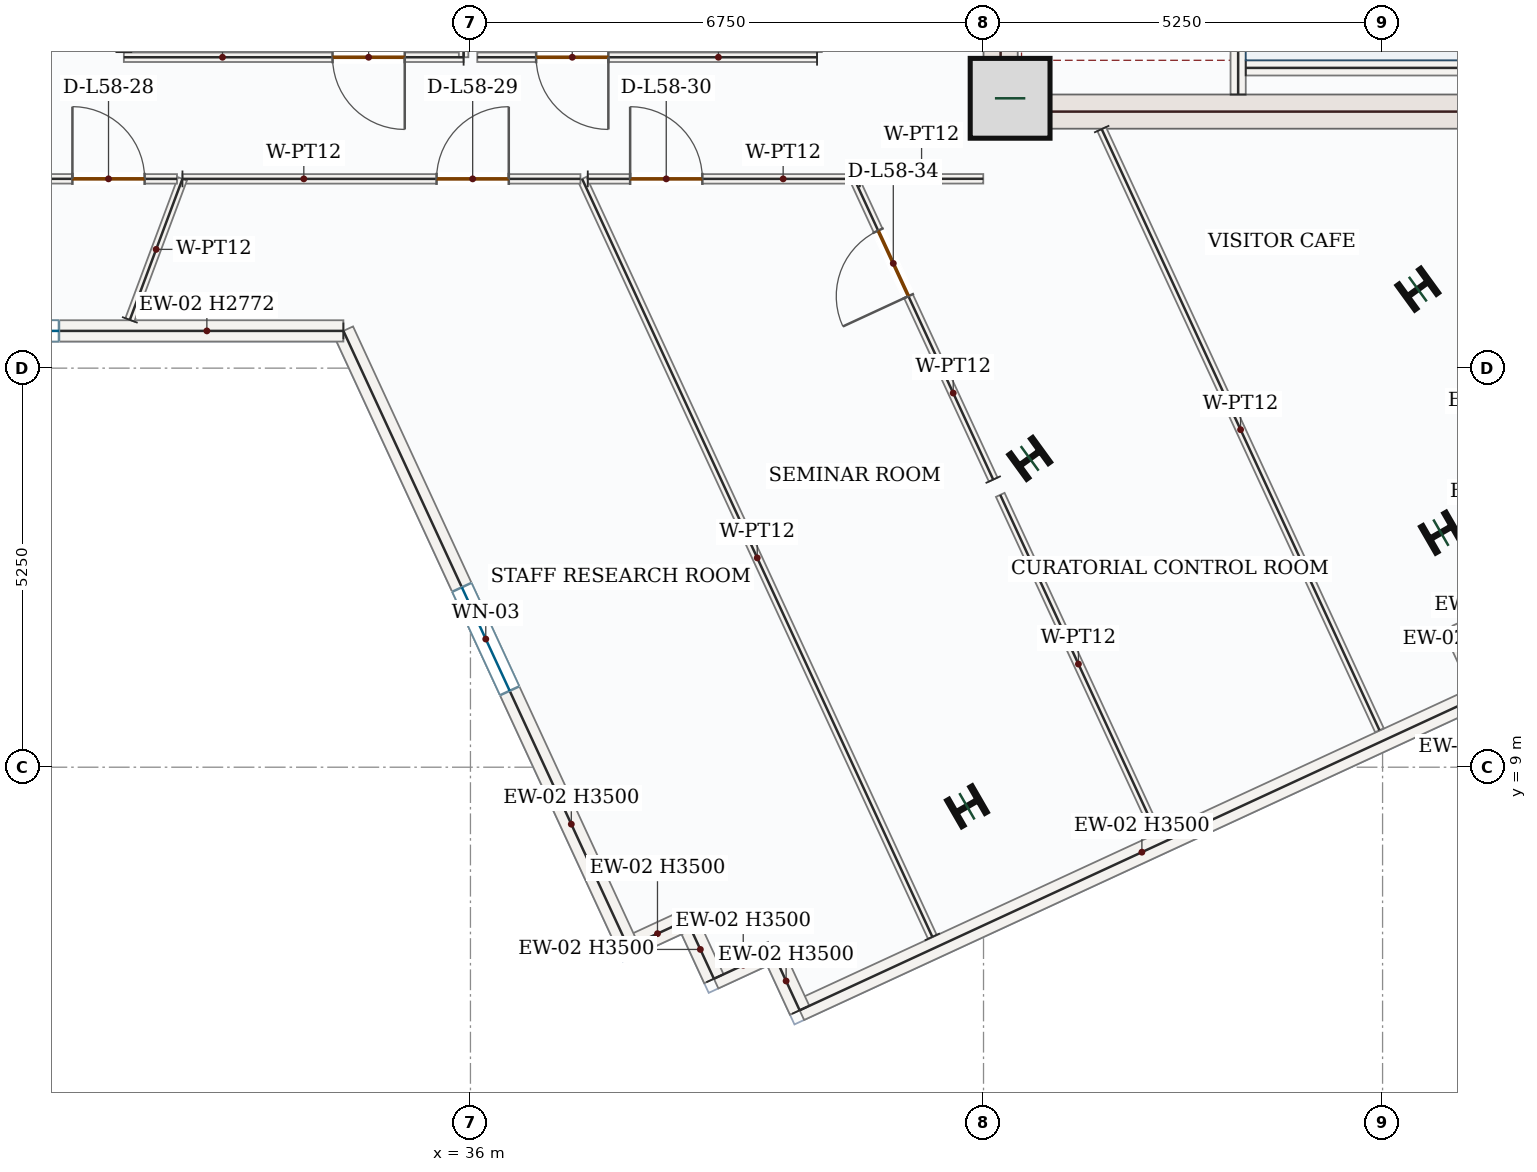
"""IFC4 building model, lengths in metres.
Left out: names, types, materials, properties, quantities, classifications, styles, units other than length and angle.
Written with IfcOpenShell. Run it as: python <this file> out.ifc"""

import sys

from ifc_helpers import new_model, si_unit, direction, frame, frame_2d, origin, origin_2d, place, context, subcontext, project, spatial, rectangle, i_section, extrude, source, transform, mapped, element, fill, save


model = new_model("IFC4")
c1 = context("Model", 3, precision=1e-05, world=origin(), true_north=direction((0.0, 1.0)))
c2 = subcontext(c1, "Body", "Model", "MODEL_VIEW")
j1 = project(units=[si_unit("LENGTHUNIT", "METRE"), si_unit("PLANEANGLEUNIT", "RADIAN")], contexts=[c1])
p1 = place(None, origin())
s1 = spatial("IfcSite", under=j1, at=p1, CompositionType="ELEMENT")
p2 = place(p1, origin())
s2 = spatial("IfcBuilding", under=s1, at=p2, CompositionType="ELEMENT")
p3 = place(p2, frame((0.0, 0.0, 246.6)))
s3 = spatial("IfcBuildingStorey", under=s2, at=p3, CompositionType="ELEMENT", Elevation=246.6)
p4 = place(p3, frame((42.975, 17.4, 0.0), z_axis=(0.0, 0.0, 1.0), x_axis=(0.0, 1.0, 0.0)))
e1 = element("IfcWall", 1, at=p4, inside=s3, PredefinedType="SHEAR", context=c2, shape_type="SweptSolid", body=[
    extrude(rectangle(XDim=8.55, YDim=0.45, at=frame_2d((4.275, 0.0))), origin(), (0.0, 0.0, 1.0), 3.5),
])
p5 = place(p4, frame((6.65, 0.0, 0.0)))
e2 = element("IfcOpeningElement", 2, at=p5, cuts=e1, PredefinedType="OPENING", context=c2, shape_type="SweptSolid", body=[
    extrude(rectangle(XDim=1.1, YDim=2.2, at=frame_2d((0.55, 1.1))), frame((0.0, 0.235, 0.0), z_axis=(0.0, -1.0, 0.0), x_axis=(1.0, 0.0, 0.0)), (0.0, 0.0, 1.0), 0.47),
])
p6 = place(p4, frame((1.75, 0.0, 0.0)))
e3 = element("IfcOpeningElement", 3, at=p6, cuts=e1, PredefinedType="OPENING", context=c2, shape_type="SweptSolid", body=[
    extrude(rectangle(XDim=1.3, YDim=2.2, at=frame_2d((0.65, 1.1))), frame((0.0, 0.235, 0.0), z_axis=(0.0, -1.0, 0.0), x_axis=(1.0, 0.0, 0.0)), (0.0, 0.0, 1.0), 0.47),
])
p7 = place(p4, frame((4.3, 0.0, 0.0)))
e4 = element("IfcOpeningElement", 4, at=p7, cuts=e1, PredefinedType="OPENING", context=c2, shape_type="SweptSolid", body=[
    extrude(rectangle(XDim=0.88, YDim=2.1, at=frame_2d((0.44, 1.05))), frame((0.0, 0.235, 0.0), z_axis=(0.0, -1.0, 0.0), x_axis=(1.0, 0.0, 0.0)), (0.0, 0.0, 1.0), 0.47),
])
m1 = source(origin(), c2, "Body", "SweptSolid", [
    extrude(rectangle(XDim=7.1, YDim=0.45, at=frame_2d((3.55, 0.0))), origin(), (0.0, 0.0, 1.0), 3.5),
])
p8 = place(p3, frame((43.2, 17.625, 0.0), z_axis=(0.0, 0.0, 1.0), x_axis=(1.0, 0.0, 0.0)))
e5 = element("IfcWall", 5, at=p8, inside=s3, PredefinedType="SHEAR", context=c2, shape_type="MappedRepresentation", body=[
    mapped(m1, transform((0.0, 0.0, 0.0), x_axis=(1.0, 0.0, 0.0), y_axis=(0.0, 1.0, 0.0), z_axis=(0.0, 0.0, 1.0), scale=1.0)),
])
m2 = source(origin(), c2, "Body", "SweptSolid", [
    extrude(rectangle(XDim=1.05, YDim=1.05, at=origin_2d()), origin(), (0.0, 0.0, 1.0), 3.75),
])
p9 = place(p3, frame((43.1, 17.8, 0.0), z_axis=(0.0, 0.0, 1.0), x_axis=(1.0, 0.0, 0.0)))
e6 = element("IfcColumn", 6, at=p9, inside=s3, PredefinedType="COLUMN", context=c2, shape_type="MappedRepresentation", body=[
    mapped(m2, transform((0.0, 0.0, 0.0), x_axis=(1.0, 0.0, 0.0), y_axis=(0.0, 1.0, 0.0), z_axis=(0.0, 0.0, 1.0), scale=1.0)),
])
m3 = source(origin(), c2, "Body", "SweptSolid", [
    extrude(i_section(OverallWidth=0.399, OverallDepth=0.386, WebThickness=0.021, FlangeThickness=0.033, FilletRadius=0.018, at=origin_2d()), origin(), (0.0, 0.0, 1.0), 3.75),
])
for number, where, z_axis, x_axis in (
    (7, (43.357, 13.063, 0.0), (0.0, 0.0, 1.0), (-0.588, 0.809, 0.0)),
    (8, (48.464, 15.289, 0.0), (0.0, 0.0, 1.0), (-0.588, 0.809, 0.0)),
    (9, (42.532, 8.486, 0.0), (0.0, 0.0, 1.0), (-0.5, 0.866, 0.0)),
    (10, (48.768, 12.086, 0.0), (0.0, 0.0, 1.0), (-0.5, 0.866, 0.0)),
):
    element("IfcColumn", number, at=place(p3, frame(where, z_axis=z_axis, x_axis=x_axis)), inside=s3, PredefinedType="COLUMN", context=c2, shape_type="MappedRepresentation", body=[
        mapped(m3, transform((0.0, 0.0, 0.0), x_axis=(1.0, 0.0, 0.0), y_axis=(0.0, 1.0, 0.0), z_axis=(0.0, 0.0, 1.0), scale=1.0)),
    ])
m4 = source(origin(), c2, "Body", "SweptSolid", [
    extrude(rectangle(XDim=0.85, YDim=0.28, at=frame_2d((0.425, 0.0))), origin(), (0.0, 0.0, 1.0), 3.5),
])
p10 = place(p3, frame((49.751, 11.091, 0.0), z_axis=(0.0, 0.0, 1.0), x_axis=(-0.907791150023, -0.419422493365, 0.0)))
e11 = element("IfcWall", 11, at=p10, inside=s3, PredefinedType="SOLIDWALL", context=c2, shape_type="MappedRepresentation", body=[
    mapped(m4, transform((0.0, 0.0, 0.0), x_axis=(1.0, 0.0, 0.0), y_axis=(0.0, 1.0, 0.0), z_axis=(0.0, 0.0, 1.0), scale=1.0)),
])
m5 = source(origin(), c2, "Body", "SweptSolid", [
    extrude(rectangle(XDim=0.85, YDim=0.28, at=frame_2d((0.425, 0.0))), origin(), (0.0, 0.0, 1.0), 3.5),
])
p11 = place(p3, frame((48.98, 10.734, 0.0), z_axis=(0.0, 0.0, 1.0), x_axis=(0.419313139191, -0.907841666427, 0.0)))
e12 = element("IfcWall", 12, at=p11, inside=s3, PredefinedType="SOLIDWALL", context=c2, shape_type="MappedRepresentation", body=[
    mapped(m5, transform((0.0, 0.0, 0.0), x_axis=(1.0, 0.0, 0.0), y_axis=(0.0, 1.0, 0.0), z_axis=(0.0, 0.0, 1.0), scale=1.0)),
])
m6 = source(origin(), c2, "Body", "SweptSolid", [
    extrude(rectangle(XDim=9.92, YDim=0.28, at=frame_2d((4.96, 0.0))), origin(), (0.0, 0.0, 1.0), 3.5),
])
p12 = place(p3, frame((49.336, 9.963, 0.0), z_axis=(0.0, 0.0, 1.0), x_axis=(-0.907779940536, -0.419446754143, 0.0)))
e13 = element("IfcWall", 13, at=p12, inside=s3, PredefinedType="SOLIDWALL", context=c2, shape_type="MappedRepresentation", body=[
    mapped(m6, transform((0.0, 0.0, 0.0), x_axis=(1.0, 0.0, 0.0), y_axis=(0.0, 1.0, 0.0), z_axis=(0.0, 0.0, 1.0), scale=1.0)),
])
p13 = place(p3, frame((40.331, 5.802, 0.0), z_axis=(0.0, 0.0, 1.0), x_axis=(-0.419422493365, 0.907791150023, 0.0)))
e14 = element("IfcWall", 14, at=p13, inside=s3, PredefinedType="SOLIDWALL", context=c2, shape_type="MappedRepresentation", body=[
    mapped(m4, transform((0.0, 0.0, 0.0), x_axis=(1.0, 0.0, 0.0), y_axis=(0.0, 1.0, 0.0), z_axis=(0.0, 0.0, 1.0), scale=1.0)),
])
p14 = place(p3, frame((39.975, 6.573, 0.0), z_axis=(0.0, 0.0, 1.0), x_axis=(-0.907841666427, -0.419313139191, 0.0)))
e15 = element("IfcWall", 15, at=p14, inside=s3, PredefinedType="SOLIDWALL", context=c2, shape_type="MappedRepresentation", body=[
    mapped(m5, transform((0.0, 0.0, 0.0), x_axis=(1.0, 0.0, 0.0), y_axis=(0.0, 1.0, 0.0), z_axis=(0.0, 0.0, 1.0), scale=1.0)),
])
p15 = place(p3, frame((39.203, 6.217, 0.0), z_axis=(0.0, 0.0, 1.0), x_axis=(-0.419422493365, 0.907791150023, 0.0)))
e16 = element("IfcWall", 16, at=p15, inside=s3, PredefinedType="SOLIDWALL", context=c2, shape_type="MappedRepresentation", body=[
    mapped(m4, transform((0.0, 0.0, 0.0), x_axis=(1.0, 0.0, 0.0), y_axis=(0.0, 1.0, 0.0), z_axis=(0.0, 0.0, 1.0), scale=1.0)),
])
p16 = place(p3, frame((38.846, 6.988, 0.0), z_axis=(0.0, 0.0, 1.0), x_axis=(-0.907841666427, -0.419313139191, 0.0)))
e17 = element("IfcWall", 17, at=p16, inside=s3, PredefinedType="SOLIDWALL", context=c2, shape_type="MappedRepresentation", body=[
    mapped(m5, transform((0.0, 0.0, 0.0), x_axis=(1.0, 0.0, 0.0), y_axis=(0.0, 1.0, 0.0), z_axis=(0.0, 0.0, 1.0), scale=1.0)),
])
p17 = place(p3, frame((38.075, 6.632, 0.0), z_axis=(0.0, 0.0, 1.0), x_axis=(-0.419437747849, 0.90778410191, 0.0)))
e18 = element("IfcWall", 18, at=p17, inside=s3, PredefinedType="SOLIDWALL", context=c2, shape_type="SweptSolid", body=[
    extrude(rectangle(XDim=8.932, YDim=0.28, at=frame_2d((4.466, 0.0))), origin(), (0.0, 0.0, 1.0), 3.5),
])
p18 = place(p17, frame((3.716, 0.0, 0.85)))
e19 = element("IfcOpeningElement", 19, at=p18, cuts=e18, PredefinedType="OPENING", context=c2, shape_type="SweptSolid", body=[
    extrude(rectangle(XDim=1.5, YDim=1.5, at=frame_2d((0.75, 0.75))), frame((0.0, 0.15, 0.0), z_axis=(0.0, -1.0, 0.0), x_axis=(1.0, 0.0, 0.0)), (0.0, 0.0, 1.0), 0.3),
])
p19 = place(p3, frame((34.328, 14.74, 0.0), z_axis=(0.0, 0.0, 1.0), x_axis=(-1.0, 0.0, 0.0)))
e20 = element("IfcWall", 20, at=p19, inside=s3, PredefinedType="SOLIDWALL", context=c2, shape_type="SweptSolid", body=[
    extrude(rectangle(XDim=8.984, YDim=0.28, at=frame_2d((4.492, 0.0))), origin(), (0.0, 0.0, 1.0), 2.772),
])
p20 = place(p19, frame((3.742, 0.0, 0.85)))
e21 = element("IfcOpeningElement", 21, at=p20, cuts=e20, PredefinedType="OPENING", context=c2, shape_type="SweptSolid", body=[
    extrude(rectangle(XDim=1.5, YDim=1.5, at=frame_2d((0.75, 0.75))), frame((0.0, 0.15, 0.0), z_axis=(0.0, -1.0, 0.0), x_axis=(1.0, 0.0, 0.0)), (0.0, 0.0, 1.0), 0.3),
])
p21 = place(p3, frame((46.1, 17.85, 0.0), z_axis=(0.0, 0.0, 1.0), x_axis=(0.0, 1.0, 0.0)))
e22 = element("IfcWall", 22, at=p21, inside=s3, PredefinedType="SOLIDWALL", context=c2, shape_type="SweptSolid", body=[
    extrude(rectangle(XDim=8.0, YDim=0.2, at=frame_2d((4.0, 0.0))), origin(), (0.0, 0.0, 1.0), 3.5),
])
p22 = place(p21, frame((6.3, 0.0, 0.0)))
e23 = element("IfcOpeningElement", 23, at=p22, cuts=e22, PredefinedType="OPENING", context=c2, shape_type="SweptSolid", body=[
    extrude(rectangle(XDim=1.05, YDim=2.15, at=frame_2d((0.525, 1.075))), frame((0.0, 0.11, 0.0), z_axis=(0.0, -1.0, 0.0), x_axis=(1.0, 0.0, 0.0)), (0.0, 0.0, 1.0), 0.22),
])
m7 = source(origin(), c2, "Body", "SweptSolid", [
    extrude(rectangle(XDim=3.25, YDim=0.2, at=frame_2d((1.625, 0.0))), origin(), (0.0, 0.0, 1.0), 3.5),
])
p23 = place(p3, frame((46.2, 18.2, 0.0), z_axis=(0.0, 0.0, 1.0), x_axis=(1.0, 0.0, 0.0)))
e24 = element("IfcWall", 24, at=p23, inside=s3, PredefinedType="SOLIDWALL", context=c2, shape_type="MappedRepresentation", body=[
    mapped(m7, transform((0.0, 0.0, 0.0), x_axis=(1.0, 0.0, 0.0), y_axis=(0.0, 1.0, 0.0), z_axis=(0.0, 0.0, 1.0), scale=1.0)),
])
p24 = place(p3, frame((35.91, 18.34, 0.0), z_axis=(0.0, 0.0, 1.0), x_axis=(-1.0, 0.0, 0.0)))
e25 = element("IfcWall", 25, at=p24, inside=s3, PredefinedType="PARTITIONING", context=c2, shape_type="SweptSolid", body=[
    extrude(rectangle(XDim=4.47, YDim=0.125, at=frame_2d((2.235, 0.0))), origin(), (0.0, 0.0, 1.0), 3.5),
])
p25 = place(p24, frame((0.774, 0.0, 0.0)))
e26 = element("IfcOpeningElement", 26, at=p25, cuts=e25, PredefinedType="OPENING", context=c2, shape_type="SweptSolid", body=[
    extrude(rectangle(XDim=0.95, YDim=2.15, at=frame_2d((0.475, 1.075))), frame((0.0, 0.073, 0.0), z_axis=(0.0, -1.0, 0.0), x_axis=(1.0, 0.0, 0.0)), (0.0, 0.0, 1.0), 0.145),
])
m8 = source(origin(), c2, "Body", "SweptSolid", [
    extrude(rectangle(XDim=3.67, YDim=0.125, at=frame_2d((1.835, 0.0))), origin(), (0.0, 0.0, 1.0), 3.5),
])
p26 = place(p3, frame((35.91, 22.01, 0.0), z_axis=(0.0, 0.0, 1.0), x_axis=(0.0, -1.0, 0.0)))
e27 = element("IfcWall", 27, at=p26, inside=s3, PredefinedType="PARTITIONING", context=c2, shape_type="MappedRepresentation", body=[
    mapped(m8, transform((0.0, 0.0, 0.0), x_axis=(1.0, 0.0, 0.0), y_axis=(0.0, 1.0, 0.0), z_axis=(0.0, 0.0, 1.0), scale=1.0)),
])
p27 = place(p3, frame((40.56, 18.34, 0.0), z_axis=(0.0, 0.0, 1.0), x_axis=(-1.0, 0.0, 0.0)))
e28 = element("IfcWall", 28, at=p27, inside=s3, PredefinedType="PARTITIONING", context=c2, shape_type="SweptSolid", body=[
    extrude(rectangle(XDim=4.47, YDim=0.125, at=frame_2d((2.235, 0.0))), origin(), (0.0, 0.0, 1.0), 3.5),
])
p28 = place(p27, frame((2.746, 0.0, 0.0)))
e29 = element("IfcOpeningElement", 29, at=p28, cuts=e28, PredefinedType="OPENING", context=c2, shape_type="SweptSolid", body=[
    extrude(rectangle(XDim=0.95, YDim=2.15, at=frame_2d((0.475, 1.075))), frame((0.0, 0.073, 0.0), z_axis=(0.0, -1.0, 0.0), x_axis=(1.0, 0.0, 0.0)), (0.0, 0.0, 1.0), 0.145),
])
m9 = source(origin(), c2, "Body", "SweptSolid", [
    extrude(rectangle(XDim=4.904, YDim=0.125, at=frame_2d((2.452, 0.0))), origin(), (0.0, 0.0, 1.0), 3.5),
])
p29 = place(p3, frame((45.027, 8.131, 0.0), z_axis=(0.0, 0.0, 1.0), x_axis=(-0.419459107568, 0.907774232438, 0.0)))
e30 = element("IfcWall", 30, at=p29, inside=s3, PredefinedType="PARTITIONING", context=c2, shape_type="MappedRepresentation", body=[
    mapped(m9, transform((0.0, 0.0, 0.0), x_axis=(1.0, 0.0, 0.0), y_axis=(0.0, 1.0, 0.0), z_axis=(0.0, 0.0, 1.0), scale=1.0)),
])
p30 = place(p3, frame((42.877, 12.784, 0.0), z_axis=(0.0, 0.0, 1.0), x_axis=(-0.419416941906, 0.907793714917, 0.0)))
e31 = element("IfcWall", 31, at=p30, inside=s3, PredefinedType="PARTITIONING", context=c2, shape_type="SweptSolid", body=[
    extrude(rectangle(XDim=4.358, YDim=0.125, at=frame_2d((2.179, 0.0))), origin(), (0.0, 0.0, 1.0), 3.5),
])
p31 = place(p30, frame((2.658, 0.0, 0.0)))
e32 = element("IfcOpeningElement", 32, at=p31, cuts=e31, PredefinedType="OPENING", context=c2, shape_type="SweptSolid", body=[
    extrude(rectangle(XDim=0.95, YDim=2.15, at=frame_2d((0.475, 1.075))), frame((0.0, 0.073, 0.0), z_axis=(0.0, -1.0, 0.0), x_axis=(1.0, 0.0, 0.0)), (0.0, 0.0, 1.0), 0.145),
])
m10 = source(origin(), c2, "Body", "SweptSolid", [
    extrude(rectangle(XDim=1.623, YDim=0.125, at=frame_2d((0.812, 0.0))), origin(), (0.0, 0.0, 1.0), 3.5),
])
p32 = place(p3, frame((41.124, 16.74, 0.0), z_axis=(0.0, 0.0, 1.0), x_axis=(0.999999717168, 0.000752105684, 0.0)))
e33 = element("IfcWall", 33, at=p32, inside=s3, PredefinedType="PARTITIONING", context=c2, shape_type="MappedRepresentation", body=[
    mapped(m10, transform((0.0, 0.0, 0.0), x_axis=(1.0, 0.0, 0.0), y_axis=(0.0, 1.0, 0.0), z_axis=(0.0, 0.0, 1.0), scale=1.0)),
])
m11 = source(origin(), c2, "Body", "SweptSolid", [
    extrude(rectangle(XDim=8.712, YDim=0.125, at=frame_2d((4.356, 0.0))), origin(), (0.0, 0.0, 1.0), 3.5),
])
p33 = place(p3, frame((44.305, 17.395, 0.0), z_axis=(0.0, 0.0, 1.0), x_axis=(0.419438424399, -0.907783789312, 0.0)))
e34 = element("IfcWall", 34, at=p33, inside=s3, PredefinedType="PARTITIONING", context=c2, shape_type="MappedRepresentation", body=[
    mapped(m11, transform((0.0, 0.0, 0.0), x_axis=(1.0, 0.0, 0.0), y_axis=(0.0, 1.0, 0.0), z_axis=(0.0, 0.0, 1.0), scale=1.0)),
])
m12 = source(origin(), c2, "Body", "SweptSolid", [
    extrude(rectangle(XDim=10.985, YDim=0.125, at=frame_2d((5.492, 0.0))), origin(), (0.0, 0.0, 1.0), 3.5),
])
p34 = place(p3, frame((42.077, 6.768, 0.0), z_axis=(0.0, 0.0, 1.0), x_axis=(-0.41945135704, 0.907777813717, 0.0)))
e35 = element("IfcWall", 35, at=p34, inside=s3, PredefinedType="PARTITIONING", context=c2, shape_type="MappedRepresentation", body=[
    mapped(m12, transform((0.0, 0.0, 0.0), x_axis=(1.0, 0.0, 0.0), y_axis=(0.0, 1.0, 0.0), z_axis=(0.0, 0.0, 1.0), scale=1.0)),
])
p35 = place(p3, frame((37.543, 16.74, 0.0), z_axis=(0.0, 0.0, 1.0), x_axis=(1.0, 0.0, 0.0)))
e36 = element("IfcWall", 36, at=p35, inside=s3, PredefinedType="PARTITIONING", context=c2, shape_type="SweptSolid", body=[
    extrude(rectangle(XDim=3.484, YDim=0.125, at=frame_2d((1.742, 0.0))), origin(), (0.0, 0.0, 1.0), 3.5),
])
p36 = place(p35, frame((0.557, 0.0, 0.0)))
e37 = element("IfcOpeningElement", 37, at=p36, cuts=e36, PredefinedType="OPENING", context=c2, shape_type="SweptSolid", body=[
    extrude(rectangle(XDim=0.95, YDim=2.15, at=frame_2d((0.475, 1.075))), frame((0.0, 0.073, 0.0), z_axis=(0.0, -1.0, 0.0), x_axis=(1.0, 0.0, 0.0)), (0.0, 0.0, 1.0), 0.145),
])
p37 = place(p3, frame((32.211, 16.74, 0.0), z_axis=(0.0, 0.0, 1.0), x_axis=(1.0, 0.0, 0.0)))
e38 = element("IfcWall", 38, at=p37, inside=s3, PredefinedType="PARTITIONING", context=c2, shape_type="SweptSolid", body=[
    extrude(rectangle(XDim=5.236, YDim=0.125, at=frame_2d((2.618, 0.0))), origin(), (0.0, 0.0, 1.0), 3.5),
])
p38 = place(p37, frame((3.343, 0.0, 0.0)))
e39 = element("IfcOpeningElement", 39, at=p38, cuts=e38, PredefinedType="OPENING", context=c2, shape_type="SweptSolid", body=[
    extrude(rectangle(XDim=0.95, YDim=2.15, at=frame_2d((0.475, 1.075))), frame((0.0, 0.073, 0.0), z_axis=(0.0, -1.0, 0.0), x_axis=(1.0, 0.0, 0.0)), (0.0, 0.0, 1.0), 0.145),
])
m13 = source(origin(), c2, "Body", "SweptSolid", [
    extrude(rectangle(XDim=1.98, YDim=0.125, at=frame_2d((0.99, 0.0))), origin(), (0.0, 0.0, 1.0), 3.5),
])
p39 = place(p3, frame((31.519, 14.885, 0.0), z_axis=(0.0, 0.0, 1.0), x_axis=(0.349690675255, 0.9368652153, 0.0)))
e40 = element("IfcWall", 40, at=p39, inside=s3, PredefinedType="PARTITIONING", context=c2, shape_type="MappedRepresentation", body=[
    mapped(m13, transform((0.0, 0.0, 0.0), x_axis=(1.0, 0.0, 0.0), y_axis=(0.0, 1.0, 0.0), z_axis=(0.0, 0.0, 1.0), scale=1.0)),
])
p40 = place(p3, frame((29.253, 16.741, 0.0), z_axis=(0.0, 0.0, 1.0), x_axis=(0.999999910531, -0.000423011806, 0.0)))
e41 = element("IfcWall", 41, at=p40, inside=s3, PredefinedType="PARTITIONING", context=c2, shape_type="SweptSolid", body=[
    extrude(rectangle(XDim=2.886, YDim=0.125, at=frame_2d((1.443, 0.0))), origin(), (0.0, 0.0, 1.0), 3.5),
])
p41 = place(p40, frame((1.51, 0.0, 0.0)))
e42 = element("IfcOpeningElement", 42, at=p41, cuts=e41, PredefinedType="OPENING", context=c2, shape_type="SweptSolid", body=[
    extrude(rectangle(XDim=0.95, YDim=2.15, at=frame_2d((0.475, 1.075))), frame((0.0, 0.073, 0.0), z_axis=(0.0, -1.0, 0.0), x_axis=(1.0, 0.0, 0.0)), (0.0, 0.0, 1.0), 0.145),
])
m14 = source(origin(), c2, "Body", "SweptSolid", [
    extrude(rectangle(XDim=1.5, YDim=1.5, at=frame_2d((0.75, 0.75))), frame((0.0, 0.03, 0.0), z_axis=(0.0, -1.0, 0.0), x_axis=(1.0, 0.0, 0.0)), (0.0, 0.0, 1.0), 0.06),
])
p42 = place(p18, origin())
e43 = element("IfcWindow", 43, at=p42, inside=s3, PartitioningType="SINGLE_PANEL", PredefinedType="WINDOW", context=c2, shape_type="MappedRepresentation", body=[
    mapped(m14, transform((0.0, 0.0, 0.0), x_axis=(1.0, 0.0, 0.0), y_axis=(0.0, 1.0, 0.0), z_axis=(0.0, 0.0, 1.0), scale=1.0)),
])
fill(e19, e43)
p43 = place(p20, origin())
e44 = element("IfcWindow", 44, at=p43, inside=s3, PartitioningType="SINGLE_PANEL", PredefinedType="WINDOW", context=c2, shape_type="MappedRepresentation", body=[
    mapped(m14, transform((0.0, 0.0, 0.0), x_axis=(1.0, 0.0, 0.0), y_axis=(0.0, 1.0, 0.0), z_axis=(0.0, 0.0, 1.0), scale=1.0)),
])
fill(e21, e44)
m15 = source(origin(), c2, "Body", "SweptSolid", [
    extrude(rectangle(XDim=0.95, YDim=2.15, at=frame_2d((0.475, 1.075))), frame((0.0, 0.025, 0.0), z_axis=(0.0, -1.0, 0.0), x_axis=(1.0, 0.0, 0.0)), (0.0, 0.0, 1.0), 0.05),
])
p44 = place(p25, origin())
e45 = element("IfcDoor", 45, at=p44, inside=s3, OperationType="SINGLE_SWING_LEFT", PredefinedType="DOOR", context=c2, shape_type="MappedRepresentation", body=[
    mapped(m15, transform((0.0, 0.0, 0.0), x_axis=(1.0, 0.0, 0.0), y_axis=(0.0, 1.0, 0.0), z_axis=(0.0, 0.0, 1.0), scale=1.0)),
])
fill(e26, e45)
p45 = place(p28, origin())
e46 = element("IfcDoor", 46, at=p45, inside=s3, OperationType="SINGLE_SWING_LEFT", PredefinedType="DOOR", context=c2, shape_type="MappedRepresentation", body=[
    mapped(m15, transform((0.0, 0.0, 0.0), x_axis=(1.0, 0.0, 0.0), y_axis=(0.0, 1.0, 0.0), z_axis=(0.0, 0.0, 1.0), scale=1.0)),
])
fill(e29, e46)
p46 = place(p41, origin())
e47 = element("IfcDoor", 47, at=p46, inside=s3, OperationType="SINGLE_SWING_LEFT", PredefinedType="DOOR", context=c2, shape_type="MappedRepresentation", body=[
    mapped(m15, transform((0.0, 0.0, 0.0), x_axis=(1.0, 0.0, 0.0), y_axis=(0.0, 1.0, 0.0), z_axis=(0.0, 0.0, 1.0), scale=1.0)),
])
fill(e42, e47)
p47 = place(p38, origin())
e48 = element("IfcDoor", 48, at=p47, inside=s3, OperationType="SINGLE_SWING_RIGHT", PredefinedType="DOOR", context=c2, shape_type="MappedRepresentation", body=[
    mapped(m15, transform((0.0, 0.0, 0.0), x_axis=(1.0, 0.0, 0.0), y_axis=(0.0, 1.0, 0.0), z_axis=(0.0, 0.0, 1.0), scale=1.0)),
])
fill(e39, e48)
p48 = place(p36, origin())
e49 = element("IfcDoor", 49, at=p48, inside=s3, OperationType="SINGLE_SWING_LEFT", PredefinedType="DOOR", context=c2, shape_type="MappedRepresentation", body=[
    mapped(m15, transform((0.0, 0.0, 0.0), x_axis=(1.0, 0.0, 0.0), y_axis=(0.0, 1.0, 0.0), z_axis=(0.0, 0.0, 1.0), scale=1.0)),
])
fill(e37, e49)
p49 = place(p31, origin())
e50 = element("IfcDoor", 50, at=p49, inside=s3, OperationType="SINGLE_SWING_LEFT", PredefinedType="DOOR", context=c2, shape_type="MappedRepresentation", body=[
    mapped(m15, transform((0.0, 0.0, 0.0), x_axis=(1.0, 0.0, 0.0), y_axis=(0.0, 1.0, 0.0), z_axis=(0.0, 0.0, 1.0), scale=1.0)),
])
fill(e32, e50)
save(model, sys.argv[1])
